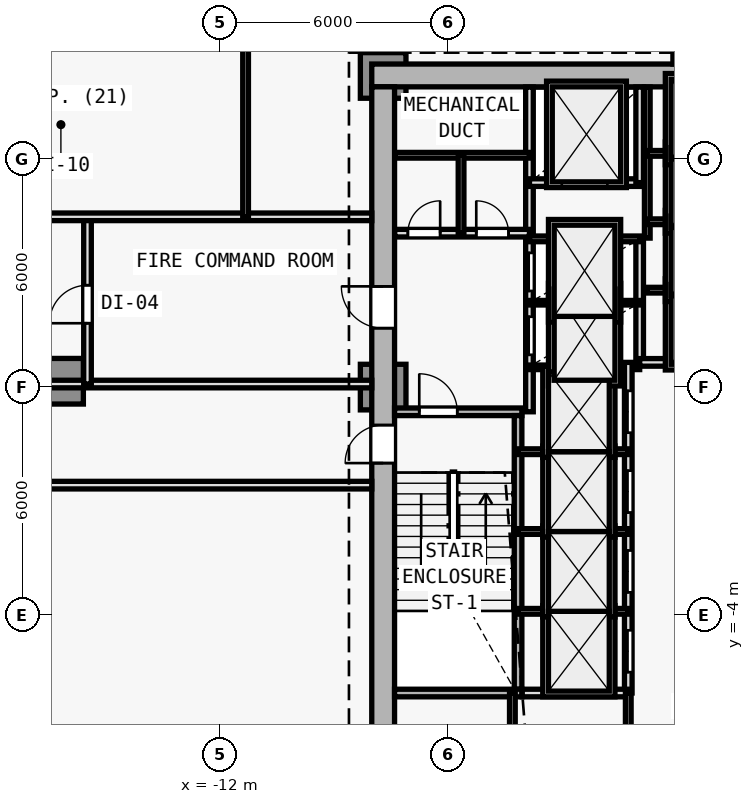
"""IFC4 building model, lengths in metres.
Left out: names, types, materials, properties, quantities, classifications, styles, units other than length and angle.
Written with IfcOpenShell. Run it as: python <this file> out.ifc"""

import sys

from ifc_helpers import new_model, si_unit, direction, frame, frame_2d, origin, origin_2d, place, context, subcontext, project, spatial, rectangle, extrude, element, fill, save


model = new_model("IFC4")
c1 = context("Model", 3, precision=1e-05, world=origin(), true_north=direction((0.0, 1.0)))
c2 = subcontext(c1, "Body", "Model", "MODEL_VIEW")
j1 = project(units=[si_unit("LENGTHUNIT", "METRE"), si_unit("PLANEANGLEUNIT", "RADIAN")], contexts=[c1])
p1 = place(None, origin())
s1 = spatial("IfcSite", under=j1, at=p1, CompositionType="ELEMENT")
p2 = place(p1, origin())
s2 = spatial("IfcBuilding", under=s1, at=p2, CompositionType="ELEMENT")
p3 = place(p2, origin())
s3 = spatial("IfcBuildingStorey", under=s2, at=p3, CompositionType="ELEMENT", Elevation=0.0)
for number, where, z_axis, x_axis in (
    (1, (-7.7, 10.2, 0.0), (0.0, 0.0, 1.0), (1.0, 0.0, 0.0)),
    (2, (-7.7, 2.0, 0.0), (0.0, 0.0, 1.0), (1.0, 0.0, 0.0)),
    (3, (-16.188, 2.154, 0.0), (0.0, 0.0, 1.0), (1.0, 0.0, 0.0)),
):
    element("IfcColumn", number, at=place(p3, frame(where, z_axis=z_axis, x_axis=x_axis)), inside=s3, PredefinedType="COLUMN", context=c2, shape_type="SweptSolid", body=[
        extrude(rectangle(XDim=1.2, YDim=1.2, at=origin_2d()), origin(), (0.0, 0.0, 1.0), 5.0),
    ])
p4 = place(p3, frame((8.0, 10.2, 0.0), z_axis=(0.0, 0.0, 1.0), x_axis=(-1.0, 0.0, 0.0)))
e4 = element("IfcWall", 4, at=p4, inside=s3, PredefinedType="SHEAR", context=c2, shape_type="SweptSolid", body=[
    extrude(rectangle(XDim=16.0, YDim=0.6, at=frame_2d((8.0, 0.0))), origin(), (0.0, 0.0, 1.0), 4.72),
])
p5 = place(p4, frame((4.45, 0.0, 0.0)))
e5 = element("IfcOpeningElement", 5, at=p5, cuts=e4, PredefinedType="OPENING", context=c2, shape_type="SweptSolid", body=[
    extrude(rectangle(XDim=1.1, YDim=2.15, at=frame_2d((0.55, 1.075))), frame((0.0, 0.31, 0.0), z_axis=(0.0, -1.0, 0.0), x_axis=(1.0, 0.0, 0.0)), (0.0, 0.0, 1.0), 0.62),
])
p6 = place(p3, frame((-7.7, -9.1, 0.0), z_axis=(0.0, 0.0, 1.0), x_axis=(0.0, 1.0, 0.0)))
e6 = element("IfcWall", 6, at=p6, inside=s3, PredefinedType="SHEAR", context=c2, shape_type="SweptSolid", body=[
    extrude(rectangle(XDim=19.0, YDim=0.6, at=frame_2d((9.5, 0.0))), origin(), (0.0, 0.0, 1.0), 4.72),
])
p7 = place(p6, frame((12.65, 0.0, 0.0)))
e7 = element("IfcOpeningElement", 7, at=p7, cuts=e6, PredefinedType="OPENING", context=c2, shape_type="SweptSolid", body=[
    extrude(rectangle(XDim=1.1, YDim=2.15, at=frame_2d((0.55, 1.075))), frame((0.0, 0.31, 0.0), z_axis=(0.0, -1.0, 0.0), x_axis=(1.0, 0.0, 0.0)), (0.0, 0.0, 1.0), 0.62),
])
p8 = place(p6, frame((9.1, 0.0, 0.0)))
e8 = element("IfcOpeningElement", 8, at=p8, cuts=e6, PredefinedType="OPENING", context=c2, shape_type="SweptSolid", body=[
    extrude(rectangle(XDim=1.0, YDim=2.15, at=frame_2d((0.5, 1.075))), frame((0.0, 0.31, 0.0), z_axis=(0.0, -1.0, 0.0), x_axis=(1.0, 0.0, 0.0)), (0.0, 0.0, 1.0), 0.62),
])
p9 = place(p3, frame((-7.4, 1.35, 0.0), z_axis=(0.0, 0.0, 1.0), x_axis=(1.0, 0.0, 0.0)))
e9 = element("IfcWall", 9, at=p9, inside=s3, PredefinedType="SOLIDWALL", context=c2, shape_type="SweptSolid", body=[
    extrude(rectangle(XDim=3.35, YDim=0.2, at=frame_2d((1.675, 0.0))), origin(), (0.0, 0.0, 1.0), 4.72),
])
p10 = place(p9, frame((0.65, 0.0, 0.0)))
e10 = element("IfcOpeningElement", 10, at=p10, cuts=e9, PredefinedType="OPENING", context=c2, shape_type="SweptSolid", body=[
    extrude(rectangle(XDim=1.0, YDim=2.15, at=frame_2d((0.5, 1.075))), frame((0.0, 0.11, 0.0), z_axis=(0.0, -1.0, 0.0), x_axis=(1.0, 0.0, 0.0)), (0.0, 0.0, 1.0), 0.22),
])
p11 = place(p3, frame((-4.15, -5.95, 0.0), z_axis=(0.0, 0.0, 1.0), x_axis=(0.0, 1.0, 0.0)))
e11 = element("IfcWall", 11, at=p11, inside=s3, PredefinedType="SOLIDWALL", context=c2, shape_type="SweptSolid", body=[
    extrude(rectangle(XDim=7.2, YDim=0.2, at=frame_2d((3.6, 0.0))), origin(), (0.0, 0.0, 1.0), 4.72),
])
p12 = place(p3, frame((-3.85, 1.35, 0.0), z_axis=(0.0, 0.0, 1.0), x_axis=(0.0, 1.0, 0.0)))
e12 = element("IfcWall", 12, at=p12, inside=s3, PredefinedType="SOLIDWALL", context=c2, shape_type="SweptSolid", body=[
    extrude(rectangle(XDim=8.545, YDim=0.2, at=frame_2d((4.272, 0.0))), origin(), (0.0, 0.0, 1.0), 4.72),
])
p13 = place(p12, frame((1.5, 0.0, 0.0)))
e13 = element("IfcOpeningElement", 13, at=p13, cuts=e12, PredefinedType="OPENING", context=c2, shape_type="SweptSolid", body=[
    extrude(rectangle(XDim=1.0, YDim=2.15, at=frame_2d((0.5, 1.075))), frame((0.0, 0.11, 0.0), z_axis=(0.0, -1.0, 0.0), x_axis=(1.0, 0.0, 0.0)), (0.0, 0.0, 1.0), 0.22),
])
p14 = place(p12, frame((3.18, 0.0, 0.0)))
e14 = element("IfcOpeningElement", 14, at=p14, cuts=e12, PredefinedType="OPENING", context=c2, shape_type="SweptSolid", body=[
    extrude(rectangle(XDim=1.0, YDim=2.15, at=frame_2d((0.5, 1.075))), frame((0.0, 0.11, 0.0), z_axis=(0.0, -1.0, 0.0), x_axis=(1.0, 0.0, 0.0)), (0.0, 0.0, 1.0), 0.22),
])
p15 = place(p3, frame((-7.395, 6.05, 0.0), z_axis=(0.0, 0.0, 1.0), x_axis=(1.0, 0.0, 0.0)))
e15 = element("IfcWall", 15, at=p15, inside=s3, PredefinedType="SOLIDWALL", context=c2, shape_type="SweptSolid", body=[
    extrude(rectangle(XDim=3.545, YDim=0.2, at=frame_2d((1.772, 0.0))), origin(), (0.0, 0.0, 1.0), 4.72),
])
p16 = place(p15, frame((0.345, 0.0, 0.0)))
e16 = element("IfcOpeningElement", 16, at=p16, cuts=e15, PredefinedType="OPENING", context=c2, shape_type="SweptSolid", body=[
    extrude(rectangle(XDim=0.85, YDim=2.1, at=frame_2d((0.425, 1.05))), frame((0.0, 0.11, 0.0), z_axis=(0.0, -1.0, 0.0), x_axis=(1.0, 0.0, 0.0)), (0.0, 0.0, 1.0), 0.22),
])
p17 = place(p15, frame((2.145, 0.0, 0.0)))
e17 = element("IfcOpeningElement", 17, at=p17, cuts=e15, PredefinedType="OPENING", context=c2, shape_type="SweptSolid", body=[
    extrude(rectangle(XDim=0.85, YDim=2.1, at=frame_2d((0.425, 1.05))), frame((0.0, 0.11, 0.0), z_axis=(0.0, -1.0, 0.0), x_axis=(1.0, 0.0, 0.0)), (0.0, 0.0, 1.0), 0.22),
])
p18 = place(p3, frame((-7.395, 8.1, 0.0), z_axis=(0.0, 0.0, 1.0), x_axis=(1.0, 0.0, 0.0)))
e18 = element("IfcWall", 18, at=p18, inside=s3, PredefinedType="PARTITIONING", context=c2, shape_type="SweptSolid", body=[
    extrude(rectangle(XDim=3.545, YDim=0.15, at=frame_2d((1.772, 0.0))), origin(), (0.0, 0.0, 1.0), 4.72),
])
p19 = place(p3, frame((-5.65, 6.05, 0.0), z_axis=(0.0, 0.0, 1.0), x_axis=(0.0, 1.0, 0.0)))
e19 = element("IfcWall", 19, at=p19, inside=s3, PredefinedType="PARTITIONING", context=c2, shape_type="SweptSolid", body=[
    extrude(rectangle(XDim=2.05, YDim=0.15, at=frame_2d((1.025, 0.0))), origin(), (0.0, 0.0, 1.0), 4.72),
])
p20 = place(p3, frame((-0.95, 2.65, 0.0), z_axis=(0.0, 0.0, 1.0), x_axis=(0.0, 1.0, 0.0)))
e20 = element("IfcWall", 20, at=p20, inside=s3, PredefinedType="SOLIDWALL", context=c2, shape_type="SweptSolid", body=[
    extrude(rectangle(XDim=3.27, YDim=0.2, at=frame_2d((1.635, 0.0))), origin(), (0.0, 0.0, 1.0), 4.72),
])
for number, where, z_axis, x_axis in (
    (21, (-3.85, 2.52, 0.0), (0.0, 0.0, 1.0), (1.0, 0.0, 0.0)),
    (22, (-3.85, 4.22, 0.0), (0.0, 0.0, 1.0), (1.0, 0.0, 0.0)),
):
    element("IfcWall", number, at=place(p3, frame(where, z_axis=z_axis, x_axis=x_axis)), inside=s3, PredefinedType="PARTITIONING", context=c2, shape_type="SweptSolid", body=[
        extrude(rectangle(XDim=2.9, YDim=0.12, at=frame_2d((1.45, 0.0))), origin(), (0.0, 0.0, 1.0), 4.72),
    ])
p21 = place(p3, frame((-3.85, 5.9, 0.0), z_axis=(0.0, 0.0, 1.0), x_axis=(1.0, 0.0, 0.0)))
e23 = element("IfcWall", 23, at=p21, inside=s3, PredefinedType="PARTITIONING", context=c2, shape_type="SweptSolid", body=[
    extrude(rectangle(XDim=2.9, YDim=0.15, at=frame_2d((1.45, 0.0))), origin(), (0.0, 0.0, 1.0), 4.72),
])
p22 = place(p3, frame((-3.85, 7.38, 0.0), z_axis=(0.0, 0.0, 1.0), x_axis=(1.0, 0.0, 0.0)))
e24 = element("IfcWall", 24, at=p22, inside=s3, PredefinedType="SOLIDWALL", context=c2, shape_type="SweptSolid", body=[
    extrude(rectangle(XDim=2.9, YDim=0.2, at=frame_2d((1.45, 0.0))), origin(), (0.0, 0.0, 1.0), 4.72),
])
p23 = place(p22, frame((0.85, 0.0, 0.0)))
e25 = element("IfcOpeningElement", 25, at=p23, cuts=e24, PredefinedType="OPENING", context=c2, shape_type="SweptSolid", body=[
    extrude(rectangle(XDim=1.2, YDim=2.2, at=frame_2d((0.6, 1.1))), frame((0.0, 0.11, 0.0), z_axis=(0.0, -1.0, 0.0), x_axis=(1.0, 0.0, 0.0)), (0.0, 0.0, 1.0), 0.22),
])
p24 = place(p3, frame((-0.95, 7.38, 0.0), z_axis=(0.0, 0.0, 1.0), x_axis=(0.0, 1.0, 0.0)))
e26 = element("IfcWall", 26, at=p24, inside=s3, PredefinedType="SOLIDWALL", context=c2, shape_type="SweptSolid", body=[
    extrude(rectangle(XDim=2.515, YDim=0.2, at=frame_2d((1.258, 0.0))), origin(), (0.0, 0.0, 1.0), 4.72),
])
p25 = place(p3, frame((-1.25, -6.05, 0.0), z_axis=(0.0, 0.0, 1.0), x_axis=(0.0, 1.0, 0.0)))
e27 = element("IfcWall", 27, at=p25, inside=s3, PredefinedType="SOLIDWALL", context=c2, shape_type="SweptSolid", body=[
    extrude(rectangle(XDim=8.7, YDim=0.2, at=frame_2d((4.35, 0.0))), origin(), (0.0, 0.0, 1.0), 4.72),
])
p26 = place(p25, frame((0.55, 0.0, 0.0)))
e28 = element("IfcOpeningElement", 28, at=p26, cuts=e27, PredefinedType="OPENING", context=c2, shape_type="SweptSolid", body=[
    extrude(rectangle(XDim=1.1, YDim=2.15, at=frame_2d((0.55, 1.075))), frame((0.0, 0.11, 0.0), z_axis=(0.0, -1.0, 0.0), x_axis=(1.0, 0.0, 0.0)), (0.0, 0.0, 1.0), 0.22),
])
p27 = place(p25, frame((2.65, 0.0, 0.0)))
e29 = element("IfcOpeningElement", 29, at=p27, cuts=e27, PredefinedType="OPENING", context=c2, shape_type="SweptSolid", body=[
    extrude(rectangle(XDim=1.1, YDim=2.15, at=frame_2d((0.55, 1.075))), frame((0.0, 0.11, 0.0), z_axis=(0.0, -1.0, 0.0), x_axis=(1.0, 0.0, 0.0)), (0.0, 0.0, 1.0), 0.22),
])
p28 = place(p25, frame((4.75, 0.0, 0.0)))
e30 = element("IfcOpeningElement", 30, at=p28, cuts=e27, PredefinedType="OPENING", context=c2, shape_type="SweptSolid", body=[
    extrude(rectangle(XDim=1.1, YDim=2.15, at=frame_2d((0.55, 1.075))), frame((0.0, 0.11, 0.0), z_axis=(0.0, -1.0, 0.0), x_axis=(1.0, 0.0, 0.0)), (0.0, 0.0, 1.0), 0.22),
])
p29 = place(p25, frame((6.85, 0.0, 0.0)))
e31 = element("IfcOpeningElement", 31, at=p29, cuts=e27, PredefinedType="OPENING", context=c2, shape_type="SweptSolid", body=[
    extrude(rectangle(XDim=1.1, YDim=2.15, at=frame_2d((0.55, 1.075))), frame((0.0, 0.11, 0.0), z_axis=(0.0, -1.0, 0.0), x_axis=(1.0, 0.0, 0.0)), (0.0, 0.0, 1.0), 0.22),
])
for number, where, z_axis, x_axis in (
    (32, (-4.15, -3.9, 0.0), (0.0, 0.0, 1.0), (1.0, 0.0, 0.0)),
    (33, (-4.15, -1.8, 0.0), (0.0, 0.0, 1.0), (1.0, 0.0, 0.0)),
    (34, (-4.15, 0.3, 0.0), (0.0, 0.0, 1.0), (1.0, 0.0, 0.0)),
):
    element("IfcWall", number, at=place(p3, frame(where, z_axis=z_axis, x_axis=x_axis)), inside=s3, PredefinedType="PARTITIONING", context=c2, shape_type="SweptSolid", body=[
        extrude(rectangle(XDim=2.9, YDim=0.15, at=frame_2d((1.45, 0.0))), origin(), (0.0, 0.0, 1.0), 4.72),
    ])
p30 = place(p3, frame((-0.95, 2.65, 0.0), z_axis=(0.0, 0.0, 1.0), x_axis=(1.0, 0.0, 0.0)))
e35 = element("IfcWall", 35, at=p30, inside=s3, PredefinedType="SOLIDWALL", context=c2, shape_type="SweptSolid", body=[
    extrude(rectangle(XDim=2.9, YDim=0.2, at=frame_2d((1.45, 0.0))), origin(), (0.0, 0.0, 1.0), 4.72),
])
p31 = place(p3, frame((-0.75, 5.92, 0.0), z_axis=(0.0, 0.0, 1.0), x_axis=(0.0, 1.0, 0.0)))
e36 = element("IfcWall", 36, at=p31, inside=s3, PredefinedType="PARTITIONING", context=c2, shape_type="SweptSolid", body=[
    extrude(rectangle(XDim=3.975, YDim=0.15, at=frame_2d((1.988, 0.0))), origin(), (0.0, 0.0, 1.0), 4.72),
])
for number, where, z_axis, x_axis in (
    (37, (-0.75, 4.55, 0.0), (0.0, 0.0, 1.0), (1.0, 0.0, 0.0)),
    (38, (-0.75, 6.35, 0.0), (0.0, 0.0, 1.0), (1.0, 0.0, 0.0)),
    (39, (-0.75, 8.15, 0.0), (0.0, 0.0, 1.0), (1.0, 0.0, 0.0)),
):
    element("IfcWall", number, at=place(p3, frame(where, z_axis=z_axis, x_axis=x_axis)), inside=s3, PredefinedType="PARTITIONING", context=c2, shape_type="SweptSolid", body=[
        extrude(rectangle(XDim=2.7, YDim=0.15, at=frame_2d((1.35, 0.0))), origin(), (0.0, 0.0, 1.0), 4.72),
    ])
p32 = place(p3, frame((-7.4, -6.05, 0.0), z_axis=(0.0, 0.0, 1.0), x_axis=(1.0, 0.0, 0.0)))
e40 = element("IfcWall", 40, at=p32, inside=s3, PredefinedType="SOLIDWALL", context=c2, shape_type="SweptSolid", body=[
    extrude(rectangle(XDim=3.35, YDim=0.2, at=frame_2d((1.675, 0.0))), origin(), (0.0, 0.0, 1.0), 4.72),
])
p33 = place(p3, frame((-4.04, -6.05, 0.0), z_axis=(0.0, 0.0, 1.0), x_axis=(1.0, 0.0, 0.0)))
e41 = element("IfcWall", 41, at=p33, inside=s3, PredefinedType="SOLIDWALL", context=c2, shape_type="SweptSolid", body=[
    extrude(rectangle(XDim=2.79, YDim=0.2, at=frame_2d((1.395, 0.0))), origin(), (0.0, 0.0, 1.0), 4.72),
])
p34 = place(p3, frame((-1.25, -9.095, 0.0), z_axis=(0.0, 0.0, 1.0), x_axis=(0.0, 1.0, 0.0)))
e42 = element("IfcWall", 42, at=p34, inside=s3, PredefinedType="PARTITIONING", context=c2, shape_type="SweptSolid", body=[
    extrude(rectangle(XDim=3.045, YDim=0.15, at=frame_2d((1.522, 0.0))), origin(), (0.0, 0.0, 1.0), 4.72),
])
p35 = place(p34, frame((0.845, 0.0, 0.0)))
e43 = element("IfcOpeningElement", 43, at=p35, cuts=e42, PredefinedType="OPENING", context=c2, shape_type="SweptSolid", body=[
    extrude(rectangle(XDim=0.95, YDim=2.1, at=frame_2d((0.475, 1.05))), frame((0.0, 0.085, 0.0), z_axis=(0.0, -1.0, 0.0), x_axis=(1.0, 0.0, 0.0)), (0.0, 0.0, 1.0), 0.17),
])
p36 = place(p3, frame((-4.3, -9.095, 0.0), z_axis=(0.0, 0.0, 1.0), x_axis=(0.0, 1.0, 0.0)))
e44 = element("IfcWall", 44, at=p36, inside=s3, PredefinedType="PARTITIONING", context=c2, shape_type="SweptSolid", body=[
    extrude(rectangle(XDim=3.045, YDim=0.15, at=frame_2d((1.522, 0.0))), origin(), (0.0, 0.0, 1.0), 4.72),
])
p37 = place(p36, frame((0.845, 0.0, 0.0)))
e45 = element("IfcOpeningElement", 45, at=p37, cuts=e44, PredefinedType="OPENING", context=c2, shape_type="SweptSolid", body=[
    extrude(rectangle(XDim=0.9, YDim=2.1, at=frame_2d((0.45, 1.05))), frame((0.0, 0.085, 0.0), z_axis=(0.0, -1.0, 0.0), x_axis=(1.0, 0.0, 0.0)), (0.0, 0.0, 1.0), 0.17),
])
p38 = place(p3, frame((-40.82, -0.58, 0.0), z_axis=(0.0, 0.0, 1.0), x_axis=(1.0, 0.0, 0.0)))
e46 = element("IfcWall", 46, at=p38, inside=s3, PredefinedType="SOLIDWALL", context=c2, shape_type="SweptSolid", body=[
    extrude(rectangle(XDim=32.82, YDim=0.2, at=frame_2d((16.41, 0.0))), origin(), (0.0, 0.0, 1.0), 4.105),
])
p39 = place(p3, frame((-40.82, 2.08, 0.0), z_axis=(0.0, 0.0, 1.0), x_axis=(1.0, 0.0, 0.0)))
e47 = element("IfcWall", 47, at=p39, inside=s3, PredefinedType="SOLIDWALL", context=c2, shape_type="SweptSolid", body=[
    extrude(rectangle(XDim=32.82, YDim=0.2, at=frame_2d((16.41, 0.0))), origin(), (0.0, 0.0, 1.0), 3.881),
])
p40 = place(p39, frame((5.5, 0.0, 0.0)))
e48 = element("IfcOpeningElement", 48, at=p40, cuts=e47, PredefinedType="OPENING", context=c2, shape_type="SweptSolid", body=[
    extrude(rectangle(XDim=1.1, YDim=2.15, at=frame_2d((0.55, 1.075))), frame((0.0, 0.11, 0.0), z_axis=(0.0, -1.0, 0.0), x_axis=(1.0, 0.0, 0.0)), (0.0, 0.0, 1.0), 0.22),
])
p41 = place(p3, frame((-15.48, 2.08, 0.0), z_axis=(0.0, 0.0, 1.0), x_axis=(0.0, 1.0, 0.0)))
e49 = element("IfcWall", 49, at=p41, inside=s3, PredefinedType="SOLIDWALL", context=c2, shape_type="SweptSolid", body=[
    extrude(rectangle(XDim=4.4, YDim=0.2, at=frame_2d((2.2, 0.0))), origin(), (0.0, 0.0, 1.0), 3.881),
])
p42 = place(p41, frame((1.6, 0.0, 0.0)))
e50 = element("IfcOpeningElement", 50, at=p42, cuts=e49, PredefinedType="OPENING", context=c2, shape_type="SweptSolid", body=[
    extrude(rectangle(XDim=1.0, YDim=2.15, at=frame_2d((0.5, 1.075))), frame((0.0, 0.11, 0.0), z_axis=(0.0, -1.0, 0.0), x_axis=(1.0, 0.0, 0.0)), (0.0, 0.0, 1.0), 0.22),
])
p43 = place(p3, frame((-16.68, 6.48, 0.0), z_axis=(0.0, 0.0, 1.0), x_axis=(1.0, 0.0, 0.0)))
e51 = element("IfcWall", 51, at=p43, inside=s3, PredefinedType="SOLIDWALL", context=c2, shape_type="SweptSolid", body=[
    extrude(rectangle(XDim=8.68, YDim=0.2, at=frame_2d((4.34, 0.0))), origin(), (0.0, 0.0, 1.0), 4.72),
])
p44 = place(p3, frame((-11.32, 6.48, 0.0), z_axis=(0.0, 0.0, 1.0), x_axis=(0.0, 1.0, 0.0)))
e52 = element("IfcWall", 52, at=p44, inside=s3, PredefinedType="PARTITIONING", context=c2, shape_type="SweptSolid", body=[
    extrude(rectangle(XDim=5.04, YDim=0.15, at=frame_2d((2.52, 0.0))), origin(), (0.0, 0.0, 1.0), 4.72),
])
p45 = place(p3, frame((0.0, 10.5, 0.0), z_axis=(0.0, 0.0, 1.0), x_axis=(0.0, 1.0, 0.0)))
e53 = element("IfcWall", 53, at=p45, inside=s3, PredefinedType="PARTITIONING", context=c2, shape_type="SweptSolid", body=[
    extrude(rectangle(XDim=17.52, YDim=0.15, at=frame_2d((8.76, 0.0))), origin(), (0.0, 0.0, 1.0), 3.881),
])
p46 = place(p7, origin())
e54 = element("IfcDoor", 54, at=p46, inside=s3, OperationType="SINGLE_SWING_RIGHT", PredefinedType="DOOR", context=c2, shape_type="SweptSolid", body=[
    extrude(rectangle(XDim=1.1, YDim=2.15, at=frame_2d((0.55, 1.075))), frame((0.0, 0.025, 0.0), z_axis=(0.0, -1.0, 0.0), x_axis=(1.0, 0.0, 0.0)), (0.0, 0.0, 1.0), 0.05),
])
fill(e7, e54)
p47 = place(p8, origin())
e55 = element("IfcDoor", 55, at=p47, inside=s3, OperationType="SINGLE_SWING_LEFT", PredefinedType="DOOR", context=c2, shape_type="SweptSolid", body=[
    extrude(rectangle(XDim=1.0, YDim=2.15, at=frame_2d((0.5, 1.075))), frame((0.0, 0.025, 0.0), z_axis=(0.0, -1.0, 0.0), x_axis=(1.0, 0.0, 0.0)), (0.0, 0.0, 1.0), 0.05),
])
fill(e8, e55)
p48 = place(p10, origin())
e56 = element("IfcDoor", 56, at=p48, inside=s3, OperationType="SINGLE_SWING_LEFT", PredefinedType="DOOR", context=c2, shape_type="SweptSolid", body=[
    extrude(rectangle(XDim=1.0, YDim=2.15, at=frame_2d((0.5, 1.075))), frame((0.0, 0.025, 0.0), z_axis=(0.0, -1.0, 0.0), x_axis=(1.0, 0.0, 0.0)), (0.0, 0.0, 1.0), 0.05),
])
fill(e10, e56)
p49 = place(p16, origin())
e57 = element("IfcDoor", 57, at=p49, inside=s3, OperationType="SINGLE_SWING_RIGHT", PredefinedType="DOOR", context=c2, shape_type="SweptSolid", body=[
    extrude(rectangle(XDim=0.85, YDim=2.1, at=frame_2d((0.425, 1.05))), frame((0.0, 0.025, 0.0), z_axis=(0.0, -1.0, 0.0), x_axis=(1.0, 0.0, 0.0)), (0.0, 0.0, 1.0), 0.05),
])
fill(e16, e57)
p50 = place(p17, origin())
e58 = element("IfcDoor", 58, at=p50, inside=s3, OperationType="SINGLE_SWING_LEFT", PredefinedType="DOOR", context=c2, shape_type="SweptSolid", body=[
    extrude(rectangle(XDim=0.85, YDim=2.1, at=frame_2d((0.425, 1.05))), frame((0.0, 0.025, 0.0), z_axis=(0.0, -1.0, 0.0), x_axis=(1.0, 0.0, 0.0)), (0.0, 0.0, 1.0), 0.05),
])
fill(e17, e58)
p51 = place(p23, origin())
e59 = element("IfcDoor", 59, at=p51, inside=s3, OperationType="DOUBLE_DOOR_SLIDING", PredefinedType="DOOR", context=c2, shape_type="SweptSolid", body=[
    extrude(rectangle(XDim=1.2, YDim=2.2, at=frame_2d((0.6, 1.1))), frame((0.0, 0.025, 0.0), z_axis=(0.0, -1.0, 0.0), x_axis=(1.0, 0.0, 0.0)), (0.0, 0.0, 1.0), 0.05),
])
fill(e25, e59)
p52 = place(p26, origin())
e60 = element("IfcDoor", 60, at=p52, inside=s3, OperationType="DOUBLE_DOOR_SLIDING", PredefinedType="DOOR", context=c2, shape_type="SweptSolid", body=[
    extrude(rectangle(XDim=1.1, YDim=2.15, at=frame_2d((0.55, 1.075))), frame((0.0, 0.025, 0.0), z_axis=(0.0, -1.0, 0.0), x_axis=(1.0, 0.0, 0.0)), (0.0, 0.0, 1.0), 0.05),
])
fill(e28, e60)
p53 = place(p27, origin())
e61 = element("IfcDoor", 61, at=p53, inside=s3, OperationType="DOUBLE_DOOR_SLIDING", PredefinedType="DOOR", context=c2, shape_type="SweptSolid", body=[
    extrude(rectangle(XDim=1.1, YDim=2.15, at=frame_2d((0.55, 1.075))), frame((0.0, 0.025, 0.0), z_axis=(0.0, -1.0, 0.0), x_axis=(1.0, 0.0, 0.0)), (0.0, 0.0, 1.0), 0.05),
])
fill(e29, e61)
p54 = place(p28, origin())
e62 = element("IfcDoor", 62, at=p54, inside=s3, OperationType="DOUBLE_DOOR_SLIDING", PredefinedType="DOOR", context=c2, shape_type="SweptSolid", body=[
    extrude(rectangle(XDim=1.1, YDim=2.15, at=frame_2d((0.55, 1.075))), frame((0.0, 0.025, 0.0), z_axis=(0.0, -1.0, 0.0), x_axis=(1.0, 0.0, 0.0)), (0.0, 0.0, 1.0), 0.05),
])
fill(e30, e62)
p55 = place(p29, origin())
e63 = element("IfcDoor", 63, at=p55, inside=s3, OperationType="DOUBLE_DOOR_SLIDING", PredefinedType="DOOR", context=c2, shape_type="SweptSolid", body=[
    extrude(rectangle(XDim=1.1, YDim=2.15, at=frame_2d((0.55, 1.075))), frame((0.0, 0.025, 0.0), z_axis=(0.0, -1.0, 0.0), x_axis=(1.0, 0.0, 0.0)), (0.0, 0.0, 1.0), 0.05),
])
fill(e31, e63)
p56 = place(p13, origin())
e64 = element("IfcDoor", 64, at=p56, inside=s3, OperationType="DOUBLE_DOOR_SLIDING", PredefinedType="DOOR", context=c2, shape_type="SweptSolid", body=[
    extrude(rectangle(XDim=1.0, YDim=2.15, at=frame_2d((0.5, 1.075))), frame((0.0, 0.025, 0.0), z_axis=(0.0, -1.0, 0.0), x_axis=(1.0, 0.0, 0.0)), (0.0, 0.0, 1.0), 0.05),
])
fill(e13, e64)
p57 = place(p14, origin())
e65 = element("IfcDoor", 65, at=p57, inside=s3, OperationType="DOUBLE_DOOR_SLIDING", PredefinedType="DOOR", context=c2, shape_type="SweptSolid", body=[
    extrude(rectangle(XDim=1.0, YDim=2.15, at=frame_2d((0.5, 1.075))), frame((0.0, 0.025, 0.0), z_axis=(0.0, -1.0, 0.0), x_axis=(1.0, 0.0, 0.0)), (0.0, 0.0, 1.0), 0.05),
])
fill(e14, e65)
p58 = place(p42, origin())
e66 = element("IfcDoor", 66, at=p58, inside=s3, OperationType="SINGLE_SWING_LEFT", PredefinedType="DOOR", context=c2, shape_type="SweptSolid", body=[
    extrude(rectangle(XDim=1.0, YDim=2.15, at=frame_2d((0.5, 1.075))), frame((0.0, 0.025, 0.0), z_axis=(0.0, -1.0, 0.0), x_axis=(1.0, 0.0, 0.0)), (0.0, 0.0, 1.0), 0.05),
])
fill(e50, e66)
save(model, sys.argv[1])
